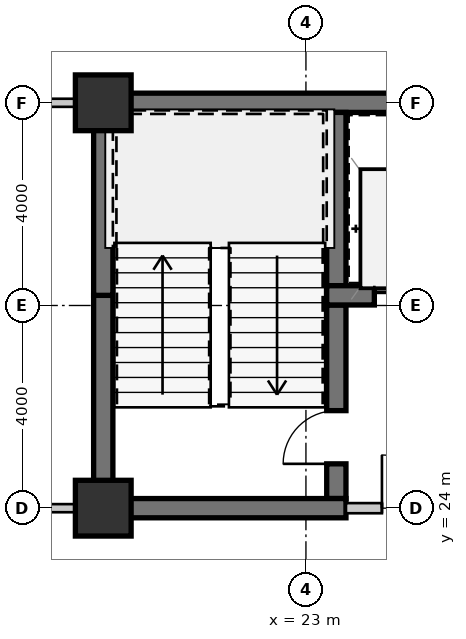
"""IFC4 building model, lengths in metres.
Left out: names, types, materials, properties, quantities, classifications, styles, units other than length and angle.
Written with IfcOpenShell. Run it as: python <this file> out.ifc"""

import sys

from ifc_helpers import new_model, si_unit, direction, frame, frame_2d, origin, origin_2d, place, context, subcontext, project, spatial, rectangle, extrude, source, transform, mapped, element, fill, save


model = new_model("IFC4")
c1 = context("Model", 3, precision=1e-05, world=origin(), true_north=direction((0.0, 1.0)))
c2 = subcontext(c1, "Body", "Model", "MODEL_VIEW")
j1 = project(units=[si_unit("LENGTHUNIT", "METRE"), si_unit("PLANEANGLEUNIT", "RADIAN")], contexts=[c1])
p1 = place(None, origin())
s1 = spatial("IfcSite", under=j1, at=p1, CompositionType="ELEMENT")
p2 = place(p1, origin())
s2 = spatial("IfcBuilding", under=s1, at=p2, CompositionType="ELEMENT")
p3 = place(p2, frame((0.0, 0.0, -4.0)))
s3 = spatial("IfcBuildingStorey", under=s2, at=p3, CompositionType="ELEMENT", Elevation=-4.0)
m1 = source(origin(), c2, "Body", "SweptSolid", [
    extrude(rectangle(XDim=1.1, YDim=1.1, at=origin_2d()), origin(), (0.0, 0.0, 1.0), 4.0),
])
for number, where, z_axis, x_axis in (
    (1, (19.0, 24.0, 0.0), (0.0, 0.0, 1.0), (1.0, 0.0, 0.0)),
    (2, (19.0, 32.0, 0.0), (0.0, 0.0, 1.0), (1.0, 0.0, 0.0)),
):
    element("IfcColumn", number, at=place(p3, frame(where, z_axis=z_axis, x_axis=x_axis)), inside=s3, PredefinedType="COLUMN", context=c2, shape_type="MappedRepresentation", body=[
        mapped(m1, transform((0.0, 0.0, 0.0), scale=1.0)),
    ])
m2 = source(origin(), c2, "Body", "SweptSolid", [
    extrude(rectangle(XDim=9.19, YDim=0.38, at=frame_2d((4.595, 0.0))), origin(), (0.0, 0.0, 1.0), 3.74),
])
p4 = place(p3, frame((18.81, 32.0, 0.0), z_axis=(0.0, 0.0, 1.0), x_axis=(1.0, 0.0, 0.0)))
e3 = element("IfcWall", 3, at=p4, inside=s3, PredefinedType="SHEAR", context=c2, shape_type="MappedRepresentation", body=[
    mapped(m2, transform((0.0, 0.0, 0.0), scale=1.0)),
])
m3 = source(origin(), c2, "Body", "SweptSolid", [
    extrude(rectangle(XDim=4.01, YDim=0.38, at=frame_2d((2.005, 0.0))), origin(), (0.0, 0.0, 1.0), 3.74),
])
p5 = place(p3, frame((19.0, 24.19, 0.0), z_axis=(0.0, 0.0, 1.0), x_axis=(0.0, 1.0, 0.0)))
e4 = element("IfcWall", 4, at=p5, inside=s3, PredefinedType="SHEAR", context=c2, shape_type="MappedRepresentation", body=[
    mapped(m3, transform((0.0, 0.0, 0.0), scale=1.0)),
])
m4 = source(origin(), c2, "Body", "SweptSolid", [
    extrude(rectangle(XDim=3.61, YDim=0.38, at=frame_2d((1.805, 0.0))), origin(), (0.0, 0.0, 1.0), 3.74),
])
p6 = place(p3, frame((19.0, 28.2, 0.0), z_axis=(0.0, 0.0, 1.0), x_axis=(0.0, 1.0, 0.0)))
e5 = element("IfcWall", 5, at=p6, inside=s3, PredefinedType="SHEAR", context=c2, shape_type="MappedRepresentation", body=[
    mapped(m4, transform((0.0, 0.0, 0.0), scale=1.0)),
])
m5 = source(origin(), c2, "Body", "SweptSolid", [
    extrude(rectangle(XDim=3.42, YDim=0.38, at=frame_2d((1.71, 0.0))), origin(), (0.0, 0.0, 1.0), 3.74),
])
p7 = place(p3, frame((23.6, 28.39, 0.0), z_axis=(0.0, 0.0, 1.0), x_axis=(0.0, 1.0, 0.0)))
e6 = element("IfcWall", 6, at=p7, inside=s3, PredefinedType="SHEAR", context=c2, shape_type="MappedRepresentation", body=[
    mapped(m5, transform((0.0, 0.0, 0.0), scale=1.0)),
])
m6 = source(origin(), c2, "Body", "SweptSolid", [
    extrude(rectangle(XDim=3.82, YDim=0.38, at=frame_2d((1.91, 0.0))), origin(), (0.0, 0.0, 1.0), 3.74),
])
p8 = place(p3, frame((23.6, 24.19, 0.0), z_axis=(0.0, 0.0, 1.0), x_axis=(0.0, 1.0, 0.0)))
e7 = element("IfcWall", 7, at=p8, inside=s3, PredefinedType="SHEAR", context=c2, shape_type="MappedRepresentation", body=[
    mapped(m6, transform((0.0, 0.0, 0.0), scale=1.0)),
])
m7 = source(origin(), c2, "Body", "SweptSolid", [
    extrude(rectangle(XDim=1.05, YDim=2.1, at=frame_2d((0.525, 1.05))), frame((0.0, 0.2, 0.0), z_axis=(0.0, -1.0, 0.0), x_axis=(1.0, 0.0, 0.0)), (0.0, 0.0, 1.0), 0.4),
])
p9 = place(p8, frame((0.685, 0.0, 0.0)))
e8 = element("IfcOpeningElement", 8, at=p9, cuts=e7, PredefinedType="OPENING", context=c2, shape_type="MappedRepresentation", body=[
    mapped(m7, transform((0.0, 0.0, 0.0), scale=1.0)),
])
m8 = source(origin(), c2, "Body", "SweptSolid", [
    extrude(rectangle(XDim=4.98, YDim=0.38, at=frame_2d((2.49, 0.0))), origin(), (0.0, 0.0, 1.0), 3.74),
])
p10 = place(p3, frame((18.81, 24.0, 0.0), z_axis=(0.0, 0.0, 1.0), x_axis=(1.0, 0.0, 0.0)))
e9 = element("IfcWall", 9, at=p10, inside=s3, PredefinedType="SHEAR", context=c2, shape_type="MappedRepresentation", body=[
    mapped(m8, transform((0.0, 0.0, 0.0), scale=1.0)),
])
m9 = source(origin(), c2, "Body", "SweptSolid", [
    extrude(rectangle(XDim=2.98, YDim=0.38, at=frame_2d((1.49, 0.0))), origin(), (0.0, 0.0, 1.0), 3.74),
])
p11 = place(p3, frame((23.41, 28.2, 0.0), z_axis=(0.0, 0.0, 1.0), x_axis=(1.0, 0.0, 0.0)))
e10 = element("IfcWall", 10, at=p11, inside=s3, PredefinedType="SHEAR", context=c2, shape_type="MappedRepresentation", body=[
    mapped(m9, transform((0.0, 0.0, 0.0), scale=1.0)),
])
m10 = source(origin(), c2, "Body", "SweptSolid", [
    extrude(rectangle(XDim=1.1, YDim=2.15, at=frame_2d((0.55, 1.075))), frame((0.0, 0.2, 0.0), z_axis=(0.0, -1.0, 0.0), x_axis=(1.0, 0.0, 0.0)), (0.0, 0.0, 1.0), 0.4),
])
p12 = place(p11, frame((0.94, 0.0, 0.0)))
e11 = element("IfcOpeningElement", 11, at=p12, cuts=e10, PredefinedType="OPENING", context=c2, shape_type="MappedRepresentation", body=[
    mapped(m10, transform((0.0, 0.0, 0.0), scale=1.0)),
])
m11 = source(origin(), c2, "Body", "SweptSolid", [
    extrude(rectangle(XDim=2.66, YDim=0.2, at=frame_2d((1.33, 0.0))), origin(), (0.0, 0.0, 1.0), 3.28),
])
p13 = place(p3, frame((23.79, 24.0, 0.0), z_axis=(0.0, 0.0, 1.0), x_axis=(1.0, 0.0, 0.0)))
e12 = element("IfcWall", 12, at=p13, inside=s3, PredefinedType="SOLIDWALL", context=c2, shape_type="MappedRepresentation", body=[
    mapped(m11, transform((0.0, 0.0, 0.0), scale=1.0)),
])
m12 = source(origin(), c2, "Body", "SweptSolid", [
    extrude(rectangle(XDim=1.05, YDim=2.1, at=frame_2d((0.525, 1.05))), frame((0.0, 0.11, 0.0), z_axis=(0.0, -1.0, 0.0), x_axis=(1.0, 0.0, 0.0)), (0.0, 0.0, 1.0), 0.22),
])
p14 = place(p13, frame((0.71, 0.0, 0.0)))
e13 = element("IfcOpeningElement", 13, at=p14, cuts=e12, PredefinedType="OPENING", context=c2, shape_type="MappedRepresentation", body=[
    mapped(m12, transform((0.0, 0.0, 0.0), scale=1.0)),
])
m13 = source(origin(), c2, "Body", "SweptSolid", [
    extrude(rectangle(XDim=10.93, YDim=0.16, at=frame_2d((5.465, 0.0))), origin(), (0.0, 0.0, 1.0), 3.74),
])
p15 = place(p3, frame((7.88, 24.0, 0.0), z_axis=(0.0, 0.0, 1.0), x_axis=(1.0, 0.0, 0.0)))
e14 = element("IfcWall", 14, at=p15, inside=s3, PredefinedType="PARTITIONING", context=c2, shape_type="MappedRepresentation", body=[
    mapped(m13, transform((0.0, 0.0, 0.0), scale=1.0)),
])
m14 = source(origin(), c2, "Body", "SweptSolid", [
    extrude(rectangle(XDim=3.79, YDim=0.16, at=frame_2d((1.895, 0.0))), origin(), (0.0, 0.0, 1.0), 3.207),
])
p16 = place(p3, frame((15.02, 32.0, 0.0), z_axis=(0.0, 0.0, 1.0), x_axis=(1.0, 0.0, 0.0)))
e15 = element("IfcWall", 15, at=p16, inside=s3, PredefinedType="PARTITIONING", context=c2, shape_type="MappedRepresentation", body=[
    mapped(m14, transform((0.0, 0.0, 0.0), scale=1.0)),
])
m15 = source(origin(), c2, "Body", "SweptSolid", [
    extrude(rectangle(XDim=1.05, YDim=2.1, at=frame_2d((0.525, 1.05))), frame((0.0, 0.025, 0.0), z_axis=(0.0, -1.0, 0.0), x_axis=(1.0, 0.0, 0.0)), (0.0, 0.0, 1.0), 0.05),
])
p17 = place(p9, origin())
e16 = element("IfcDoor", 16, at=p17, inside=s3, OperationType="SINGLE_SWING_LEFT", PredefinedType="DOOR", context=c2, shape_type="MappedRepresentation", body=[
    mapped(m15, transform((0.0, 0.0, 0.0), scale=1.0)),
])
fill(e8, e16)
m16 = source(origin(), c2, "Body", "SweptSolid", [
    extrude(rectangle(XDim=1.1, YDim=2.15, at=frame_2d((0.55, 1.075))), frame((0.0, 0.025, 0.0), z_axis=(0.0, -1.0, 0.0), x_axis=(1.0, 0.0, 0.0)), (0.0, 0.0, 1.0), 0.05),
])
p18 = place(p12, origin())
e17 = element("IfcDoor", 17, at=p18, inside=s3, OperationType="SLIDING_TO_LEFT", PredefinedType="DOOR", context=c2, shape_type="MappedRepresentation", body=[
    mapped(m16, transform((0.0, 0.0, 0.0), scale=1.0)),
])
fill(e11, e17)
p19 = place(p14, origin())
e18 = element("IfcDoor", 18, at=p19, inside=s3, OperationType="SINGLE_SWING_LEFT", PredefinedType="DOOR", context=c2, shape_type="MappedRepresentation", body=[
    mapped(m15, transform((0.0, 0.0, 0.0), scale=1.0)),
])
fill(e13, e18)
save(model, sys.argv[1])
